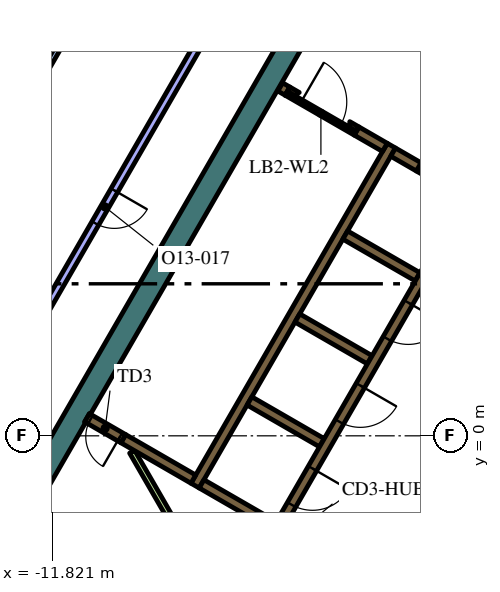
"""IFC4 building model, lengths in metres.
Left out: names, types, materials, properties, quantities, classifications, styles, units other than length and angle.
Written with IfcOpenShell. Run it as: python <this file> out.ifc"""

import sys

from ifc_helpers import new_model, si_unit, direction, frame, frame_2d, origin, place, context, subcontext, project, spatial, polyline, rectangle, outline, extrude, element, fill, save


model = new_model("IFC4")
c1 = context("Model", 3, precision=1e-05, world=origin(), true_north=direction((0.0, 1.0)))
c2 = subcontext(c1, "Body", "Model", "MODEL_VIEW")
j1 = project(units=[si_unit("LENGTHUNIT", "METRE"), si_unit("PLANEANGLEUNIT", "RADIAN")], contexts=[c1])
p1 = place(None, origin())
s1 = spatial("IfcSite", under=j1, at=p1, CompositionType="ELEMENT")
p2 = place(p1, origin())
s2 = spatial("IfcBuilding", under=s1, at=p2, CompositionType="ELEMENT")
p3 = place(p2, frame((0.0, 0.0, 292.2)))
s3 = spatial("IfcBuildingStorey", under=s2, at=p3, CompositionType="ELEMENT", Elevation=292.2)
p4 = place(p3, origin())
e1 = element("IfcWall", 1, at=p4, inside=s3, PredefinedType="SOLIDWALL", context=c2, shape_type="SweptSolid", body=[
    extrude(outline(polyline([(-15.502, -6.35), (-4.912, 11.992), (-4.393, 11.692), (-10.815, 0.569), (-10.84, 0.583), (-10.84, 0.583), (-10.84, 0.583), (-10.965, 0.367), (-10.965, 0.367), (-10.965, 0.367), (-10.94, 0.352), (-11.033, 0.191), (-14.809, -6.35), (-15.156, -6.95), (-15.502, -6.35)])), origin(), (0.0, 0.0, 1.0), 4.2),
])
p5 = place(p3, frame((-8.06, -1.311, 0.0), z_axis=(0.0, 0.0, 1.0), x_axis=(0.50000273126, 0.866023826885, 0.0)))
e2 = element("IfcWall", 2, at=p5, inside=s3, PredefinedType="SOLIDWALL", context=c2, shape_type="SweptSolid", body=[
    extrude(rectangle(XDim=10.33, YDim=0.25, at=frame_2d((5.165, 0.0))), origin(), (0.0, 0.0, 1.0), 4.2),
])
p6 = place(p3, frame((-1.819, 6.87, 0.0), z_axis=(0.0, 0.0, 1.0), x_axis=(-0.866294599386, 0.499533449405, 0.0)))
e3 = element("IfcWall", 3, at=p6, inside=s3, PredefinedType="SOLIDWALL", context=c2, shape_type="SweptSolid", body=[
    extrude(rectangle(XDim=0.41, YDim=0.25, at=frame_2d((0.205, 0.0))), origin(), (0.0, 0.0, 1.0), 4.2),
])
p7 = place(p3, frame((-2.849, 7.465, 0.0), z_axis=(0.0, 0.0, 1.0), x_axis=(0.865955664968, -0.500120771724, 0.0)))
e4 = element("IfcWall", 4, at=p7, inside=s3, PredefinedType="SOLIDWALL", context=c2, shape_type="SweptSolid", body=[
    extrude(rectangle(XDim=0.778, YDim=0.25, at=frame_2d((0.389, 0.0))), origin(), (0.0, 0.0, 1.0), 4.2),
])
for number, where, z_axis, x_axis in (
    (5, (-2.204, 4.182, 0.0), (0.0, 0.0, 1.0), (-0.866, 0.5, 0.0)),
    (6, (-5.369, 3.1, 0.0), (0.0, 0.0, 1.0), (0.866, -0.5, 0.0)),
    (7, (-4.724, -0.182, 0.0), (0.0, 0.0, 1.0), (-0.866, 0.5, 0.0)),
):
    element("IfcWall", number, at=place(p3, frame(where, z_axis=z_axis, x_axis=x_axis)), inside=s3, PredefinedType="SOLIDWALL", context=c2, shape_type="SweptSolid", body=[
        extrude(rectangle(XDim=2.2, YDim=0.25, at=frame_2d((1.1, 0.0))), origin(), (0.0, 0.0, 1.0), 4.2),
    ])
p8 = place(p3, frame((-7.889, -1.265, 0.0), z_axis=(0.0, 0.0, 1.0), x_axis=(0.866057815567, -0.499943856944, 0.0)))
e8 = element("IfcWall", 8, at=p8, inside=s3, PredefinedType="SOLIDWALL", context=c2, shape_type="SweptSolid", body=[
    extrude(rectangle(XDim=2.45, YDim=0.25, at=frame_2d((1.225, 0.0))), origin(), (0.0, 0.0, 1.0), 4.2),
])
p9 = place(p3, frame((-9.95, -0.075, 0.0), z_axis=(0.0, 0.0, 1.0), x_axis=(0.865962177421, -0.500109495288, 0.0)))
e9 = element("IfcWall", 9, at=p9, inside=s3, PredefinedType="SOLIDWALL", context=c2, shape_type="SweptSolid", body=[
    extrude(rectangle(XDim=2.129, YDim=0.25, at=frame_2d((1.065, 0.0))), origin(), (0.0, 0.0, 1.0), 4.2),
])
p10 = place(p3, frame((-5.629, 9.07, 0.0), z_axis=(0.0, 0.0, 1.0), x_axis=(-0.866185586049, 0.49972245349, 0.0)))
e10 = element("IfcWall", 10, at=p10, inside=s3, PredefinedType="SOLIDWALL", context=c2, shape_type="SweptSolid", body=[
    extrude(rectangle(XDim=0.22, YDim=0.25, at=frame_2d((0.11, 0.0))), origin(), (0.0, 0.0, 1.0), 4.2),
])
p11 = place(p3, frame((-3.809, 8.019, 0.0), z_axis=(0.0, 0.0, 1.0), x_axis=(0.866010229787, -0.500026281214, 0.0)))
e11 = element("IfcWall", 11, at=p11, inside=s3, PredefinedType="SOLIDWALL", context=c2, shape_type="SweptSolid", body=[
    extrude(rectangle(XDim=0.858, YDim=0.25, at=frame_2d((0.429, 0.0))), origin(), (0.0, 0.0, 1.0), 4.2),
])
e12 = element("IfcWall", 12, at=p4, inside=s3, PredefinedType="SOLIDWALL", context=c2, shape_type="SweptSolid", body=[
    extrude(outline(polyline([(-3.748, 8.128), (-3.813, 8.015), (-4.027, 8.139), (-4.017, 8.156), (-4.008, 8.173), (-4.0, 8.192), (-3.995, 8.21), (-3.991, 8.23), (-3.99, 8.25), (-3.99, 8.268), (-3.748, 8.128)])), origin(), (0.0, 0.0, 1.0), 4.2),
])
e13 = element("IfcWall", 13, at=p4, inside=s3, PredefinedType="SOLIDWALL", context=c2, shape_type="SweptSolid", body=[
    extrude(outline(polyline([(-5.689, 8.96), (-5.69, 8.961), (-5.565, 9.177), (-5.319, 9.035), (-5.335, 9.026), (-5.351, 9.015), (-5.366, 9.002), (-5.379, 8.988), (-5.392, 8.972), (-5.402, 8.956), (-5.412, 8.939), (-5.629, 9.064), (-5.629, 9.064), (-5.689, 8.96)])), origin(), (0.0, 0.0, 1.0), 4.2),
])
p12 = place(p3, frame((-9.718, -0.417, 0.0), z_axis=(0.0, 0.0, 1.0), x_axis=(0.499966538646, -0.866044721844, 0.0)))
e14 = element("IfcWall", 14, at=p12, inside=s3, PredefinedType="PARTITIONING", context=c2, shape_type="SweptSolid", body=[
    extrude(rectangle(XDim=2.511, YDim=0.15, at=frame_2d((1.255, 0.0))), origin(), (0.0, 0.0, 1.0), 3.55),
])
p13 = place(p3, frame((-6.653, -2.477, 0.0), z_axis=(0.0, 0.0, 1.0), x_axis=(-0.500002592159, 0.866023907196, 0.0)))
e15 = element("IfcWall", 15, at=p13, inside=s3, PredefinedType="PARTITIONING", context=c2, shape_type="SweptSolid", body=[
    extrude(rectangle(XDim=0.503, YDim=0.15, at=frame_2d((0.251, 0.0))), origin(), (0.0, 0.0, 1.0), 3.55),
])
p14 = place(p3, frame((-0.898, 6.194, 0.0), z_axis=(0.0, 0.0, 1.0), x_axis=(-0.499996202215, -0.866027596426, 0.0)))
e16 = element("IfcWall", 16, at=p14, inside=s3, PredefinedType="SOLIDWALL", context=c2, shape_type="SweptSolid", body=[
    extrude(rectangle(XDim=9.83, YDim=0.25, at=frame_2d((4.915, 0.0))), origin(), (0.0, 0.0, 1.0), 4.2),
])
p15 = place(p14, frame((0.585, 0.0, 0.0)))
e17 = element("IfcOpeningElement", 17, at=p15, cuts=e16, PredefinedType="OPENING", context=c2, shape_type="SweptSolid", body=[
    extrude(rectangle(XDim=1.1, YDim=2.1, at=frame_2d((0.55, 1.05))), frame((0.0, 0.135, 0.0), z_axis=(0.0, -1.0, 0.0), x_axis=(1.0, 0.0, 0.0)), (0.0, 0.0, 1.0), 0.27),
])
p16 = place(p14, frame((3.105, 0.0, 0.0)))
e18 = element("IfcOpeningElement", 18, at=p16, cuts=e16, PredefinedType="OPENING", context=c2, shape_type="SweptSolid", body=[
    extrude(rectangle(XDim=1.1, YDim=2.1, at=frame_2d((0.55, 1.05))), frame((0.0, 0.135, 0.0), z_axis=(0.0, -1.0, 0.0), x_axis=(1.0, 0.0, 0.0)), (0.0, 0.0, 1.0), 0.27),
])
p17 = place(p14, frame((5.625, 0.0, 0.0)))
e19 = element("IfcOpeningElement", 19, at=p17, cuts=e16, PredefinedType="OPENING", context=c2, shape_type="SweptSolid", body=[
    extrude(rectangle(XDim=1.1, YDim=2.1, at=frame_2d((0.55, 1.05))), frame((0.0, 0.135, 0.0), z_axis=(0.0, -1.0, 0.0), x_axis=(1.0, 0.0, 0.0)), (0.0, 0.0, 1.0), 0.27),
])
p18 = place(p14, frame((8.145, 0.0, 0.0)))
e20 = element("IfcOpeningElement", 20, at=p18, cuts=e16, PredefinedType="OPENING", context=c2, shape_type="SweptSolid", body=[
    extrude(rectangle(XDim=1.1, YDim=2.1, at=frame_2d((0.55, 1.05))), frame((0.0, 0.135, 0.0), z_axis=(0.0, -1.0, 0.0), x_axis=(1.0, 0.0, 0.0)), (0.0, 0.0, 1.0), 0.27),
])
p19 = place(p3, frame((-5.659, 9.012, 0.0), z_axis=(0.0, 0.0, 1.0), x_axis=(0.866009402589, -0.500027713859, 0.0)))
e21 = element("IfcWall", 21, at=p19, inside=s3, PredefinedType="PARTITIONING", context=c2, shape_type="SweptSolid", body=[
    extrude(rectangle(XDim=2.1, YDim=0.12, at=frame_2d((1.05, 0.0))), origin(), (0.0, 0.0, 1.0), 3.55),
])
p20 = place(p19, frame((0.45, 0.0, 0.0)))
e22 = element("IfcOpeningElement", 22, at=p20, cuts=e21, PredefinedType="OPENING", context=c2, shape_type="SweptSolid", body=[
    extrude(rectangle(XDim=1.2, YDim=2.1, at=frame_2d((0.6, 1.05))), frame((0.0, 0.07, 0.0), z_axis=(0.0, -1.0, 0.0), x_axis=(1.0, 0.0, 0.0)), (0.0, 0.0, 1.0), 0.14),
])
p21 = place(p3, frame((-9.95, -0.075, 0.0), z_axis=(0.0, 0.0, 1.0), x_axis=(-0.865952669392, 0.500125958508, 0.0)))
e23 = element("IfcWall", 23, at=p21, inside=s3, PredefinedType="SOLIDWALL", context=c2, shape_type="SweptSolid", body=[
    extrude(rectangle(XDim=1.1, YDim=0.25, at=frame_2d((0.55, 0.0))), origin(), (0.0, 0.0, 1.0), 4.2),
])
p22 = place(p21, frame((0.1, 0.0, 0.0)))
e24 = element("IfcOpeningElement", 24, at=p22, cuts=e23, PredefinedType="OPENING", context=c2, shape_type="SweptSolid", body=[
    extrude(rectangle(XDim=0.9, YDim=2.1, at=frame_2d((0.45, 1.05))), frame((0.0, 0.135, 0.0), z_axis=(0.0, -1.0, 0.0), x_axis=(1.0, 0.0, 0.0)), (0.0, 0.0, 1.0), 0.27),
])
p23 = place(p3, frame((-14.74, 4.887, 0.0), z_axis=(0.0, 0.0, 1.0), x_axis=(0.500007141444, 0.86602128063, 0.0)))
e25 = element("IfcWall", 25, at=p23, inside=s3, PredefinedType="PARTITIONING", context=c2, shape_type="SweptSolid", body=[
    extrude(rectangle(XDim=6.137, YDim=0.15, at=frame_2d((3.068, 0.0))), origin(), (0.0, 0.0, 1.0), 3.55),
])
p24 = place(p23, frame((2.637, 0.0, 0.0)))
e26 = element("IfcOpeningElement", 26, at=p24, cuts=e25, PredefinedType="OPENING", context=c2, shape_type="SweptSolid", body=[
    extrude(rectangle(XDim=0.9, YDim=2.1, at=frame_2d((0.45, 1.05))), frame((0.0, 0.085, 0.0), z_axis=(0.0, -1.0, 0.0), x_axis=(1.0, 0.0, 0.0)), (0.0, 0.0, 1.0), 0.17),
])
p25 = place(p3, frame((-7.436, 11.221, 0.0), z_axis=(0.0, 0.0, 1.0), x_axis=(-0.49999894854, -0.866026010844, 0.0)))
e27 = element("IfcWall", 27, at=p25, inside=s3, PredefinedType="PARTITIONING", context=c2, shape_type="SweptSolid", body=[
    extrude(rectangle(XDim=12.0, YDim=0.2, at=frame_2d((6.0, 0.0))), origin(), (0.0, 0.0, 1.0), 3.55),
])
p26 = place(p25, frame((5.5, 0.0, 0.0)))
e28 = element("IfcOpeningElement", 28, at=p26, cuts=e27, PredefinedType="OPENING", context=c2, shape_type="SweptSolid", body=[
    extrude(rectangle(XDim=1.0, YDim=2.1, at=frame_2d((0.5, 1.05))), frame((0.0, 0.11, 0.0), z_axis=(0.0, -1.0, 0.0), x_axis=(1.0, 0.0, 0.0)), (0.0, 0.0, 1.0), 0.22),
])
p27 = place(p16, origin())
e29 = element("IfcDoor", 29, at=p27, inside=s3, OperationType="DOUBLE_DOOR_SLIDING", PredefinedType="DOOR", context=c2, shape_type="SweptSolid", body=[
    extrude(rectangle(XDim=1.1, YDim=2.1, at=frame_2d((0.55, 1.05))), frame((0.0, 0.025, 0.0), z_axis=(0.0, -1.0, 0.0), x_axis=(1.0, 0.0, 0.0)), (0.0, 0.0, 1.0), 0.05),
])
fill(e18, e29)
p28 = place(p17, origin())
e30 = element("IfcDoor", 30, at=p28, inside=s3, OperationType="DOUBLE_DOOR_SLIDING", PredefinedType="DOOR", context=c2, shape_type="SweptSolid", body=[
    extrude(rectangle(XDim=1.1, YDim=2.1, at=frame_2d((0.55, 1.05))), frame((0.0, 0.025, 0.0), z_axis=(0.0, -1.0, 0.0), x_axis=(1.0, 0.0, 0.0)), (0.0, 0.0, 1.0), 0.05),
])
fill(e19, e30)
p29 = place(p18, origin())
e31 = element("IfcDoor", 31, at=p29, inside=s3, OperationType="DOUBLE_DOOR_SLIDING", PredefinedType="DOOR", context=c2, shape_type="SweptSolid", body=[
    extrude(rectangle(XDim=1.1, YDim=2.1, at=frame_2d((0.55, 1.05))), frame((0.0, 0.025, 0.0), z_axis=(0.0, -1.0, 0.0), x_axis=(1.0, 0.0, 0.0)), (0.0, 0.0, 1.0), 0.05),
])
fill(e20, e31)
p30 = place(p20, origin())
e32 = element("IfcDoor", 32, at=p30, inside=s3, OperationType="SINGLE_SWING_LEFT", PredefinedType="DOOR", context=c2, shape_type="SweptSolid", body=[
    extrude(rectangle(XDim=1.2, YDim=2.1, at=frame_2d((0.6, 1.05))), frame((0.0, 0.025, 0.0), z_axis=(0.0, -1.0, 0.0), x_axis=(1.0, 0.0, 0.0)), (0.0, 0.0, 1.0), 0.05),
])
fill(e22, e32)
p31 = place(p22, origin())
e33 = element("IfcDoor", 33, at=p31, inside=s3, OperationType="SINGLE_SWING_LEFT", PredefinedType="DOOR", context=c2, shape_type="SweptSolid", body=[
    extrude(rectangle(XDim=0.9, YDim=2.1, at=frame_2d((0.45, 1.05))), frame((0.0, 0.025, 0.0), z_axis=(0.0, -1.0, 0.0), x_axis=(1.0, 0.0, 0.0)), (0.0, 0.0, 1.0), 0.05),
])
fill(e24, e33)
p32 = place(p26, origin())
e34 = element("IfcDoor", 34, at=p32, inside=s3, OperationType="SINGLE_SWING_RIGHT", PredefinedType="DOOR", context=c2, shape_type="SweptSolid", body=[
    extrude(rectangle(XDim=1.0, YDim=2.1, at=frame_2d((0.5, 1.05))), frame((0.0, 0.025, 0.0), z_axis=(0.0, -1.0, 0.0), x_axis=(1.0, 0.0, 0.0)), (0.0, 0.0, 1.0), 0.05),
])
fill(e28, e34)
save(model, sys.argv[1])
